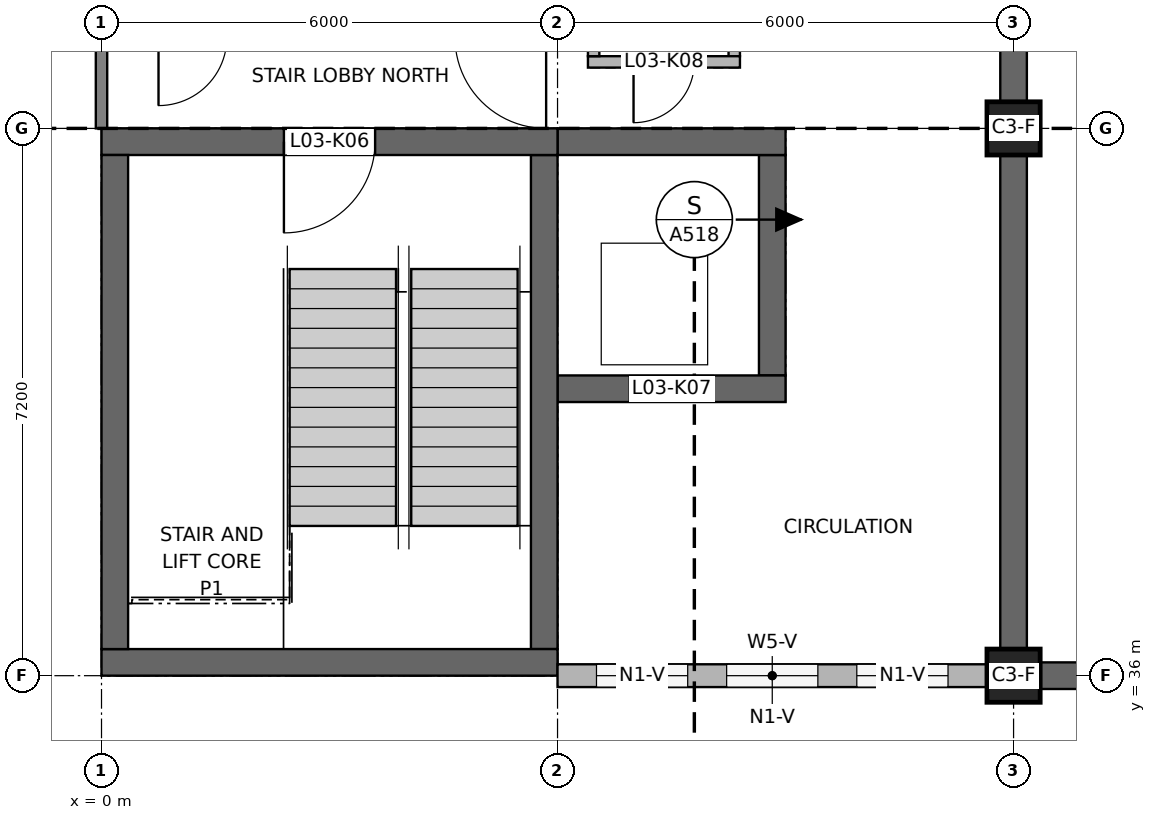
"""IFC4 building model, lengths in metres.
Left out: names, types, materials, properties, quantities, classifications, styles, units other than length and angle.
Written with IfcOpenShell. Run it as: python <this file> out.ifc"""

import sys

from ifc_helpers import new_model, si_unit, direction, frame, frame_2d, origin, origin_2d, place, context, subcontext, project, spatial, rectangle, extrude, element, fill, save


model = new_model("IFC4")
c1 = context("Model", 3, precision=1e-05, world=origin(), true_north=direction((0.0, 1.0)))
c2 = subcontext(c1, "Body", "Model", "MODEL_VIEW")
j1 = project(units=[si_unit("LENGTHUNIT", "METRE"), si_unit("PLANEANGLEUNIT", "RADIAN")], contexts=[c1])
p1 = place(None, origin())
s1 = spatial("IfcSite", under=j1, at=p1, CompositionType="ELEMENT")
p2 = place(p1, origin())
s2 = spatial("IfcBuilding", under=s1, at=p2, CompositionType="ELEMENT")
p3 = place(p2, frame((0.0, 0.0, 12.6)))
s3 = spatial("IfcBuildingStorey", under=s2, at=p3, CompositionType="ELEMENT", Elevation=12.6)
p4 = place(p3, frame((0.0, 36.175, 0.0), z_axis=(0.0, 0.0, 1.0), x_axis=(1.0, 0.0, 0.0)))
e1 = element("IfcWall", 1, at=p4, inside=s3, PredefinedType="SHEAR", context=c2, shape_type="SweptSolid", body=[
    extrude(rectangle(XDim=6.0, YDim=0.35, at=frame_2d((3.0, 0.0))), origin(), (0.0, 0.0, 1.0), 4.0),
])
p5 = place(p3, frame((0.0, 43.025, 0.0), z_axis=(0.0, 0.0, 1.0), x_axis=(1.0, 0.0, 0.0)))
e2 = element("IfcWall", 2, at=p5, inside=s3, PredefinedType="SHEAR", context=c2, shape_type="SweptSolid", body=[
    extrude(rectangle(XDim=6.0, YDim=0.35, at=frame_2d((3.0, 0.0))), origin(), (0.0, 0.0, 1.0), 4.0),
])
p6 = place(p5, frame((2.4, 0.0, 0.0)))
e3 = element("IfcOpeningElement", 3, at=p6, cuts=e2, PredefinedType="OPENING", context=c2, shape_type="SweptSolid", body=[
    extrude(rectangle(XDim=1.2, YDim=2.1, at=frame_2d((0.6, 1.05))), frame((0.0, 0.185, 0.0), z_axis=(0.0, -1.0, 0.0), x_axis=(1.0, 0.0, 0.0)), (0.0, 0.0, 1.0), 0.37),
])
for number, where, z_axis, x_axis in (
    (4, (0.175, 36.35, 0.0), (0.0, 0.0, 1.0), (0.0, 1.0, 0.0)),
    (5, (5.825, 36.35, 0.0), (0.0, 0.0, 1.0), (0.0, 1.0, 0.0)),
):
    element("IfcWall", number, at=place(p3, frame(where, z_axis=z_axis, x_axis=x_axis)), inside=s3, PredefinedType="SHEAR", context=c2, shape_type="SweptSolid", body=[
        extrude(rectangle(XDim=6.5, YDim=0.35, at=frame_2d((3.25, 0.0))), origin(), (0.0, 0.0, 1.0), 4.0),
    ])
p7 = place(p3, frame((6.0, 39.775, 0.0), z_axis=(0.0, 0.0, 1.0), x_axis=(1.0, 0.0, 0.0)))
e6 = element("IfcWall", 6, at=p7, inside=s3, PredefinedType="SHEAR", context=c2, shape_type="SweptSolid", body=[
    extrude(rectangle(XDim=3.0, YDim=0.35, at=frame_2d((1.5, 0.0))), origin(), (0.0, 0.0, 1.0), 4.2),
])
p8 = place(p7, frame((0.95, 0.0, 0.0)))
e7 = element("IfcOpeningElement", 7, at=p8, cuts=e6, PredefinedType="OPENING", context=c2, shape_type="SweptSolid", body=[
    extrude(rectangle(XDim=1.1, YDim=2.1, at=frame_2d((0.55, 1.05))), frame((0.0, 0.185, 0.0), z_axis=(0.0, -1.0, 0.0), x_axis=(1.0, 0.0, 0.0)), (0.0, 0.0, 1.0), 0.37),
])
p9 = place(p3, frame((6.0, 43.025, 0.0), z_axis=(0.0, 0.0, 1.0), x_axis=(1.0, 0.0, 0.0)))
e8 = element("IfcWall", 8, at=p9, inside=s3, PredefinedType="SHEAR", context=c2, shape_type="SweptSolid", body=[
    extrude(rectangle(XDim=3.0, YDim=0.35, at=frame_2d((1.5, 0.0))), origin(), (0.0, 0.0, 1.0), 4.2),
])
p10 = place(p3, frame((8.825, 39.95, 0.0), z_axis=(0.0, 0.0, 1.0), x_axis=(0.0, 1.0, 0.0)))
e9 = element("IfcWall", 9, at=p10, inside=s3, PredefinedType="SHEAR", context=c2, shape_type="SweptSolid", body=[
    extrude(rectangle(XDim=2.9, YDim=0.35, at=frame_2d((1.45, 0.0))), origin(), (0.0, 0.0, 1.0), 4.2),
])
p11 = place(p3, frame((6.4, 44.075, 0.0), z_axis=(0.0, 0.0, 1.0), x_axis=(1.0, 0.0, 0.0)))
e10 = element("IfcWall", 10, at=p11, inside=s3, PredefinedType="SOLIDWALL", context=c2, shape_type="SweptSolid", body=[
    extrude(rectangle(XDim=2.0, YDim=0.15, at=frame_2d((1.0, 0.0))), origin(), (0.0, 0.0, 1.0), 4.2),
])
p12 = place(p11, frame((0.6, 0.0, 0.0)))
e11 = element("IfcOpeningElement", 11, at=p12, cuts=e10, PredefinedType="OPENING", context=c2, shape_type="SweptSolid", body=[
    extrude(rectangle(XDim=0.8, YDim=2.1, at=frame_2d((0.4, 1.05))), frame((0.0, 0.085, 0.0), z_axis=(0.0, -1.0, 0.0), x_axis=(1.0, 0.0, 0.0)), (0.0, 0.0, 1.0), 0.17),
])
for number, where, z_axis, x_axis in (
    (12, (6.475, 44.15, 0.0), (0.0, 0.0, 1.0), (0.0, 1.0, 0.0)),
    (13, (8.325, 44.15, 0.0), (0.0, 0.0, 1.0), (0.0, 1.0, 0.0)),
):
    element("IfcWall", number, at=place(p3, frame(where, z_axis=z_axis, x_axis=x_axis)), inside=s3, PredefinedType="SOLIDWALL", context=c2, shape_type="SweptSolid", body=[
        extrude(rectangle(XDim=0.9, YDim=0.15, at=frame_2d((0.45, 0.0))), origin(), (0.0, 0.0, 1.0), 4.2),
    ])
for number, where, z_axis, x_axis in (
    (14, (12.0, 36.0, 0.0), (0.0, 0.0, 1.0), (1.0, 0.0, 0.0)),
    (15, (12.0, 43.2, 0.0), (0.0, 0.0, 1.0), (1.0, 0.0, 0.0)),
):
    element("IfcColumn", number, at=place(p3, frame(where, z_axis=z_axis, x_axis=x_axis)), inside=s3, PredefinedType="COLUMN", context=c2, shape_type="SweptSolid", body=[
        extrude(rectangle(XDim=0.7, YDim=0.7, at=origin_2d()), origin(), (0.0, 0.0, 1.0), 4.0),
    ])
for number, where, z_axis, x_axis in (
    (16, (12.0, 36.35, 0.0), (0.0, 0.0, 1.0), (0.0, 1.0, 0.0)),
    (17, (12.0, 43.55, 0.0), (0.0, 0.0, 1.0), (0.0, 1.0, 0.0)),
):
    element("IfcWall", number, at=place(p3, frame(where, z_axis=z_axis, x_axis=x_axis)), inside=s3, PredefinedType="SHEAR", context=c2, shape_type="SweptSolid", body=[
        extrude(rectangle(XDim=6.5, YDim=0.35, at=frame_2d((3.25, 0.0))), origin(), (0.0, 0.0, 1.0), 3.1),
    ])
p13 = place(p3, frame((12.35, 36.0, 0.0), z_axis=(0.0, 0.0, 1.0), x_axis=(1.0, 0.0, 0.0)))
e18 = element("IfcWall", 18, at=p13, inside=s3, PredefinedType="SHEAR", context=c2, shape_type="SweptSolid", body=[
    extrude(rectangle(XDim=17.475, YDim=0.35, at=frame_2d((8.737, 0.0))), origin(), (0.0, 0.0, 1.0), 3.158),
])
p14 = place(p3, frame((6.0, 36.0, 0.0), z_axis=(0.0, 0.0, 1.0), x_axis=(1.0, 0.0, 0.0)))
e19 = element("IfcWall", 19, at=p14, inside=s3, PredefinedType="SOLIDWALL", context=c2, shape_type="SweptSolid", body=[
    extrude(rectangle(XDim=5.65, YDim=0.3, at=frame_2d((2.825, 0.0))), origin(), (0.0, 0.0, 1.0), 3.2),
])
p15 = place(p14, frame((0.512, 0.0, 0.9)))
e20 = element("IfcOpeningElement", 20, at=p15, cuts=e19, PredefinedType="OPENING", context=c2, shape_type="SweptSolid", body=[
    extrude(rectangle(XDim=1.2, YDim=1.5, at=frame_2d((0.6, 0.75))), frame((0.0, 0.16, 0.0), z_axis=(0.0, -1.0, 0.0), x_axis=(1.0, 0.0, 0.0)), (0.0, 0.0, 1.0), 0.32),
])
p16 = place(p14, frame((2.225, 0.0, 0.9)))
e21 = element("IfcOpeningElement", 21, at=p16, cuts=e19, PredefinedType="OPENING", context=c2, shape_type="SweptSolid", body=[
    extrude(rectangle(XDim=1.2, YDim=1.5, at=frame_2d((0.6, 0.75))), frame((0.0, 0.16, 0.0), z_axis=(0.0, -1.0, 0.0), x_axis=(1.0, 0.0, 0.0)), (0.0, 0.0, 1.0), 0.32),
])
p17 = place(p14, frame((3.938, 0.0, 0.9)))
e22 = element("IfcOpeningElement", 22, at=p17, cuts=e19, PredefinedType="OPENING", context=c2, shape_type="SweptSolid", body=[
    extrude(rectangle(XDim=1.2, YDim=1.5, at=frame_2d((0.6, 0.75))), frame((0.0, 0.16, 0.0), z_axis=(0.0, -1.0, 0.0), x_axis=(1.0, 0.0, 0.0)), (0.0, 0.0, 1.0), 0.32),
])
p18 = place(p15, origin())
e23 = element("IfcWindow", 23, at=p18, inside=s3, PartitioningType="SINGLE_PANEL", PredefinedType="WINDOW", context=c2, shape_type="SweptSolid", body=[
    extrude(rectangle(XDim=1.2, YDim=1.5, at=frame_2d((0.6, 0.75))), frame((0.0, 0.03, 0.0), z_axis=(0.0, -1.0, 0.0), x_axis=(1.0, 0.0, 0.0)), (0.0, 0.0, 1.0), 0.06),
])
fill(e20, e23)
p19 = place(p16, origin())
e24 = element("IfcWindow", 24, at=p19, inside=s3, PartitioningType="SINGLE_PANEL", PredefinedType="WINDOW", context=c2, shape_type="SweptSolid", body=[
    extrude(rectangle(XDim=1.2, YDim=1.5, at=frame_2d((0.6, 0.75))), frame((0.0, 0.03, 0.0), z_axis=(0.0, -1.0, 0.0), x_axis=(1.0, 0.0, 0.0)), (0.0, 0.0, 1.0), 0.06),
])
fill(e21, e24)
p20 = place(p17, origin())
e25 = element("IfcWindow", 25, at=p20, inside=s3, PartitioningType="SINGLE_PANEL", PredefinedType="WINDOW", context=c2, shape_type="SweptSolid", body=[
    extrude(rectangle(XDim=1.2, YDim=1.5, at=frame_2d((0.6, 0.75))), frame((0.0, 0.03, 0.0), z_axis=(0.0, -1.0, 0.0), x_axis=(1.0, 0.0, 0.0)), (0.0, 0.0, 1.0), 0.06),
])
fill(e22, e25)
p21 = place(p6, frame((1.2, 0.0, 0.0), z_axis=(0.0, 0.0, 1.0), x_axis=(-1.0, 0.0, 0.0)))
e26 = element("IfcDoor", 26, at=p21, inside=s3, OperationType="SINGLE_SWING_RIGHT", PredefinedType="DOOR", context=c2, shape_type="SweptSolid", body=[
    extrude(rectangle(XDim=1.2, YDim=2.1, at=frame_2d((0.6, 1.05))), frame((0.0, 0.025, 0.0), z_axis=(0.0, -1.0, 0.0), x_axis=(1.0, 0.0, 0.0)), (0.0, 0.0, 1.0), 0.05),
])
fill(e3, e26)
p22 = place(p8, origin())
e27 = element("IfcDoor", 27, at=p22, inside=s3, OperationType="DOUBLE_DOOR_SLIDING", PredefinedType="DOOR", context=c2, shape_type="SweptSolid", body=[
    extrude(rectangle(XDim=1.1, YDim=2.1, at=frame_2d((0.55, 1.05))), frame((0.0, 0.025, 0.0), z_axis=(0.0, -1.0, 0.0), x_axis=(1.0, 0.0, 0.0)), (0.0, 0.0, 1.0), 0.05),
])
fill(e7, e27)
p23 = place(p12, frame((0.8, 0.0, 0.0), z_axis=(0.0, 0.0, 1.0), x_axis=(-1.0, 0.0, 0.0)))
e28 = element("IfcDoor", 28, at=p23, inside=s3, OperationType="SINGLE_SWING_RIGHT", PredefinedType="DOOR", context=c2, shape_type="SweptSolid", body=[
    extrude(rectangle(XDim=0.8, YDim=2.1, at=frame_2d((0.4, 1.05))), frame((0.0, 0.025, 0.0), z_axis=(0.0, -1.0, 0.0), x_axis=(1.0, 0.0, 0.0)), (0.0, 0.0, 1.0), 0.05),
])
fill(e11, e28)
save(model, sys.argv[1])
